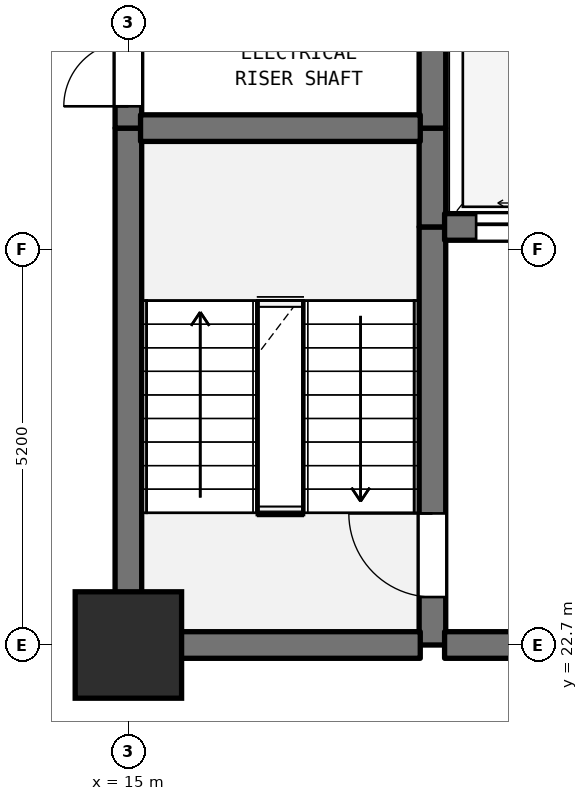
"""IFC4 building model, lengths in metres.
Left out: names, types, materials, properties, quantities, classifications, styles, units other than length and angle.
Written with IfcOpenShell. Run it as: python <this file> out.ifc"""

import sys

from ifc_helpers import new_model, si_unit, direction, frame, frame_2d, origin, origin_2d, place, context, subcontext, project, spatial, rectangle, extrude, element, fill, save


model = new_model("IFC4")
c1 = context("Model", 3, precision=1e-05, world=origin(), true_north=direction((0.0, 1.0)))
c2 = subcontext(c1, "Body", "Model", "MODEL_VIEW")
j1 = project(units=[si_unit("LENGTHUNIT", "METRE"), si_unit("PLANEANGLEUNIT", "RADIAN")], contexts=[c1])
p1 = place(None, origin())
s1 = spatial("IfcSite", under=j1, at=p1, CompositionType="ELEMENT")
p2 = place(p1, origin())
s2 = spatial("IfcBuilding", under=s1, at=p2, CompositionType="ELEMENT")
p3 = place(p2, frame((0.0, 0.0, 13.0)))
s3 = spatial("IfcBuildingStorey", under=s2, at=p3, CompositionType="ELEMENT", Elevation=13.0)
p4 = place(p3, frame((15.0, 22.7, 0.0), z_axis=(0.0, 0.0, 1.0), x_axis=(1.0, 0.0, 0.0)))
e1 = element("IfcColumn", 1, at=p4, inside=s3, PredefinedType="COLUMN", context=c2, shape_type="SweptSolid", body=[
    extrude(rectangle(XDim=1.4, YDim=1.4, at=origin_2d()), origin(), (0.0, 0.0, 1.0), 6.0),
])
p5 = place(p3, frame((15.0, 22.7, 0.0), z_axis=(0.0, 0.0, 1.0), x_axis=(0.0, 1.0, 0.0)))
e2 = element("IfcWall", 2, at=p5, inside=s3, PredefinedType="SHEAR", context=c2, shape_type="SweptSolid", body=[
    extrude(rectangle(XDim=6.8, YDim=0.35, at=frame_2d((3.4, 0.0))), origin(), (0.0, 0.0, 1.0), 5.58),
])
p6 = place(p3, frame((15.0, 29.5, 0.0), z_axis=(0.0, 0.0, 1.0), x_axis=(0.0, 1.0, 0.0)))
e3 = element("IfcWall", 3, at=p6, inside=s3, PredefinedType="SHEAR", context=c2, shape_type="SweptSolid", body=[
    extrude(rectangle(XDim=1.6, YDim=0.35, at=frame_2d((0.8, 0.0))), origin(), (0.0, 0.0, 1.0), 5.58),
])
p7 = place(p6, frame((0.287, 0.0, 0.0)))
e4 = element("IfcOpeningElement", 4, at=p7, cuts=e3, PredefinedType="OPENING", context=c2, shape_type="SweptSolid", body=[
    extrude(rectangle(XDim=0.85, YDim=2.1, at=frame_2d((0.425, 1.05))), frame((0.0, 0.185, 0.0), z_axis=(0.0, -1.0, 0.0), x_axis=(1.0, 0.0, 0.0)), (0.0, 0.0, 1.0), 0.37),
])
p8 = place(p3, frame((19.0, 22.7, 0.0), z_axis=(0.0, 0.0, 1.0), x_axis=(0.0, 1.0, 0.0)))
e5 = element("IfcWall", 5, at=p8, inside=s3, PredefinedType="SHEAR", context=c2, shape_type="SweptSolid", body=[
    extrude(rectangle(XDim=5.5, YDim=0.35, at=frame_2d((2.75, 0.0))), origin(), (0.0, 0.0, 1.0), 5.58),
])
p9 = place(p8, frame((0.631, 0.0, 0.0)))
e6 = element("IfcOpeningElement", 6, at=p9, cuts=e5, PredefinedType="OPENING", context=c2, shape_type="SweptSolid", body=[
    extrude(rectangle(XDim=1.1, YDim=2.15, at=frame_2d((0.55, 1.075))), frame((0.0, 0.185, 0.0), z_axis=(0.0, -1.0, 0.0), x_axis=(1.0, 0.0, 0.0)), (0.0, 0.0, 1.0), 0.37),
])
p10 = place(p3, frame((19.0, 28.2, 0.0), z_axis=(0.0, 0.0, 1.0), x_axis=(0.0, 1.0, 0.0)))
e7 = element("IfcWall", 7, at=p10, inside=s3, PredefinedType="SHEAR", context=c2, shape_type="SweptSolid", body=[
    extrude(rectangle(XDim=1.3, YDim=0.35, at=frame_2d((0.65, 0.0))), origin(), (0.0, 0.0, 1.0), 5.58),
])
p11 = place(p3, frame((19.0, 29.5, 0.0), z_axis=(0.0, 0.0, 1.0), x_axis=(0.0, 1.0, 0.0)))
e8 = element("IfcWall", 8, at=p11, inside=s3, PredefinedType="SHEAR", context=c2, shape_type="SweptSolid", body=[
    extrude(rectangle(XDim=5.5, YDim=0.35, at=frame_2d((2.75, 0.0))), origin(), (0.0, 0.0, 1.0), 5.58),
])
p12 = place(p11, frame((2.025, 0.0, 0.0)))
e9 = element("IfcOpeningElement", 9, at=p12, cuts=e8, PredefinedType="OPENING", context=c2, shape_type="SweptSolid", body=[
    extrude(rectangle(XDim=1.1, YDim=2.15, at=frame_2d((0.55, 1.075))), frame((0.0, 0.185, 0.0), z_axis=(0.0, -1.0, 0.0), x_axis=(1.0, 0.0, 0.0)), (0.0, 0.0, 1.0), 0.37),
])
p13 = place(p3, frame((15.16, 22.7, 0.0), z_axis=(0.0, 0.0, 1.0), x_axis=(1.0, 0.0, 0.0)))
e10 = element("IfcWall", 10, at=p13, inside=s3, PredefinedType="SHEAR", context=c2, shape_type="SweptSolid", body=[
    extrude(rectangle(XDim=3.68, YDim=0.35, at=frame_2d((1.84, 0.0))), origin(), (0.0, 0.0, 1.0), 5.58),
])
p14 = place(p3, frame((19.16, 22.7, 0.0), z_axis=(0.0, 0.0, 1.0), x_axis=(1.0, 0.0, 0.0)))
e11 = element("IfcWall", 11, at=p14, inside=s3, PredefinedType="SHEAR", context=c2, shape_type="SweptSolid", body=[
    extrude(rectangle(XDim=4.48, YDim=0.35, at=frame_2d((2.24, 0.0))), origin(), (0.0, 0.0, 1.0), 5.58),
])
p15 = place(p14, frame((1.64, 0.0, 0.0)))
e12 = element("IfcOpeningElement", 12, at=p15, cuts=e11, PredefinedType="OPENING", context=c2, shape_type="SweptSolid", body=[
    extrude(rectangle(XDim=1.2, YDim=2.2, at=frame_2d((0.6, 1.1))), frame((0.0, 0.185, 0.0), z_axis=(0.0, -1.0, 0.0), x_axis=(1.0, 0.0, 0.0)), (0.0, 0.0, 1.0), 0.37),
])
p16 = place(p3, frame((19.16, 28.2, 0.0), z_axis=(0.0, 0.0, 1.0), x_axis=(1.0, 0.0, 0.0)))
e13 = element("IfcWall", 13, at=p16, inside=s3, PredefinedType="SHEAR", context=c2, shape_type="SweptSolid", body=[
    extrude(rectangle(XDim=4.48, YDim=0.35, at=frame_2d((2.24, 0.0))), origin(), (0.0, 0.0, 1.0), 5.58),
])
p17 = place(p16, frame((0.415, 0.0, 0.0)))
e14 = element("IfcOpeningElement", 14, at=p17, cuts=e13, PredefinedType="OPENING", context=c2, shape_type="SweptSolid", body=[
    extrude(rectangle(XDim=1.25, YDim=2.2, at=frame_2d((0.625, 1.1))), frame((0.0, 0.185, 0.0), z_axis=(0.0, -1.0, 0.0), x_axis=(1.0, 0.0, 0.0)), (0.0, 0.0, 1.0), 0.37),
])
p18 = place(p16, frame((2.815, 0.0, 0.0)))
e15 = element("IfcOpeningElement", 15, at=p18, cuts=e13, PredefinedType="OPENING", context=c2, shape_type="SweptSolid", body=[
    extrude(rectangle(XDim=1.25, YDim=2.2, at=frame_2d((0.625, 1.1))), frame((0.0, 0.185, 0.0), z_axis=(0.0, -1.0, 0.0), x_axis=(1.0, 0.0, 0.0)), (0.0, 0.0, 1.0), 0.37),
])
p19 = place(p3, frame((15.16, 29.5, 0.0), z_axis=(0.0, 0.0, 1.0), x_axis=(1.0, 0.0, 0.0)))
e16 = element("IfcWall", 16, at=p19, inside=s3, PredefinedType="SHEAR", context=c2, shape_type="SweptSolid", body=[
    extrude(rectangle(XDim=3.68, YDim=0.35, at=frame_2d((1.84, 0.0))), origin(), (0.0, 0.0, 1.0), 5.58),
])
p20 = place(p7, origin())
e17 = element("IfcDoor", 17, at=p20, inside=s3, OperationType="SINGLE_SWING_LEFT", PredefinedType="DOOR", context=c2, shape_type="SweptSolid", body=[
    extrude(rectangle(XDim=0.85, YDim=2.1, at=frame_2d((0.425, 1.05))), frame((0.0, 0.025, 0.0), z_axis=(0.0, -1.0, 0.0), x_axis=(1.0, 0.0, 0.0)), (0.0, 0.0, 1.0), 0.05),
])
fill(e4, e17)
p21 = place(p9, origin())
e18 = element("IfcDoor", 18, at=p21, inside=s3, OperationType="SINGLE_SWING_RIGHT", PredefinedType="DOOR", context=c2, shape_type="SweptSolid", body=[
    extrude(rectangle(XDim=1.1, YDim=2.15, at=frame_2d((0.55, 1.075))), frame((0.0, 0.025, 0.0), z_axis=(0.0, -1.0, 0.0), x_axis=(1.0, 0.0, 0.0)), (0.0, 0.0, 1.0), 0.05),
])
fill(e6, e18)
p22 = place(p17, origin())
e19 = element("IfcDoor", 19, at=p22, inside=s3, OperationType="DOUBLE_DOOR_SLIDING", PredefinedType="DOOR", context=c2, shape_type="SweptSolid", body=[
    extrude(rectangle(XDim=1.25, YDim=2.2, at=frame_2d((0.625, 1.1))), frame((0.0, 0.025, 0.0), z_axis=(0.0, -1.0, 0.0), x_axis=(1.0, 0.0, 0.0)), (0.0, 0.0, 1.0), 0.05),
])
fill(e14, e19)
save(model, sys.argv[1])
